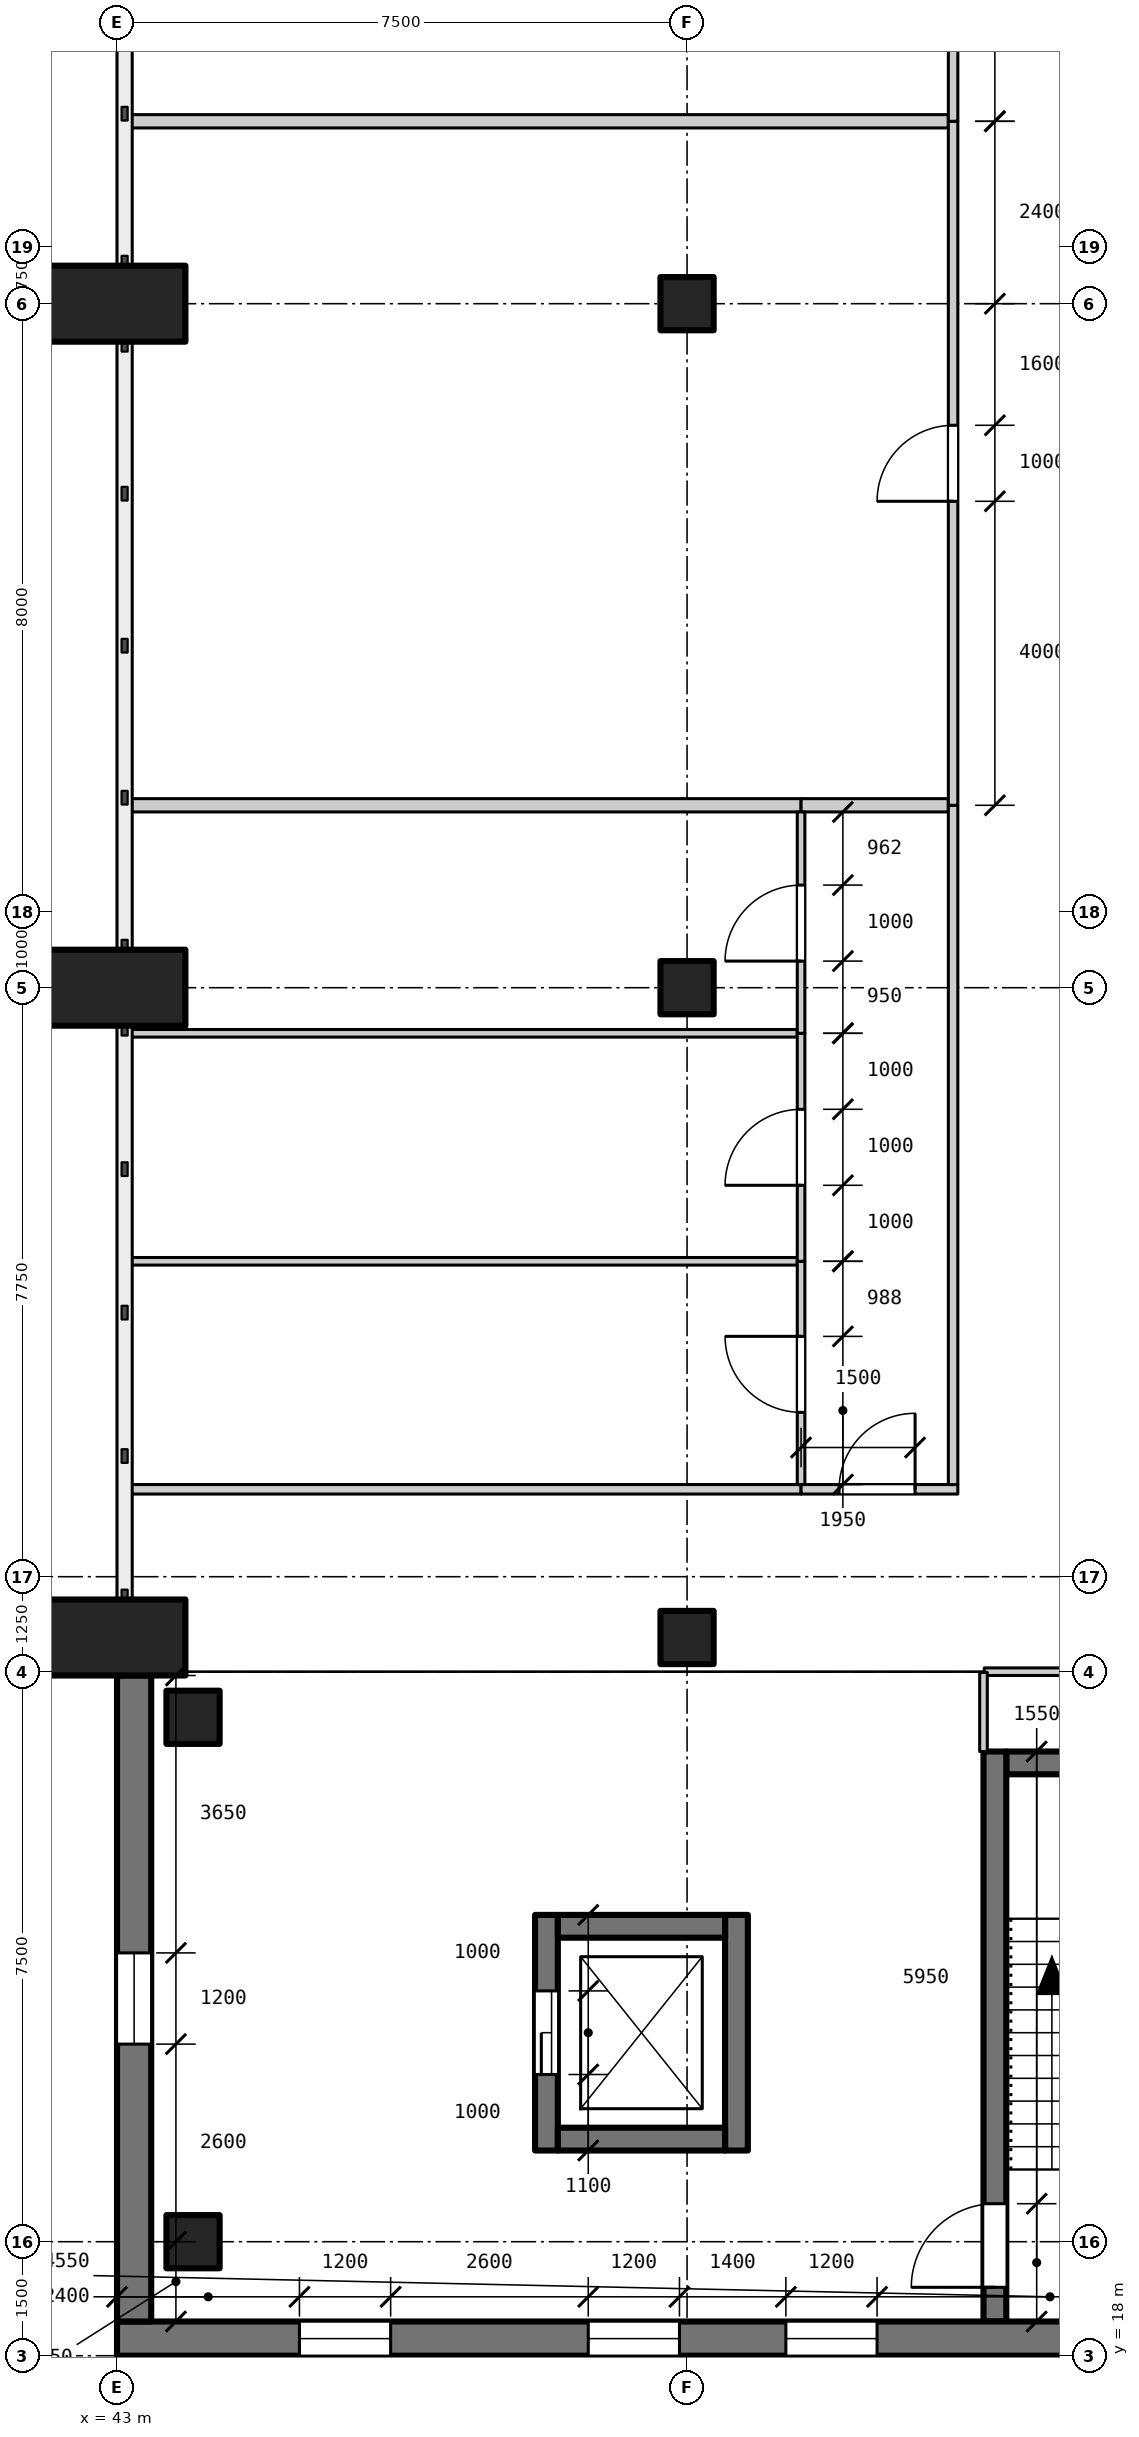
"""IFC4 building model, lengths in metres.
Left out: names, types, materials, properties, quantities, classifications, styles, units other than length and angle.
Written with IfcOpenShell. Run it as: python <this file> out.ifc"""

import sys

from ifc_helpers import new_model, si_unit, direction, frame, frame_2d, origin, origin_2d, place, context, subcontext, project, spatial, rectangle, extrude, element, fill, save


model = new_model("IFC4")
c1 = context("Model", 3, precision=1e-05, world=origin(), true_north=direction((0.0, 1.0)))
c2 = subcontext(c1, "Body", "Model", "MODEL_VIEW")
j1 = project(units=[si_unit("LENGTHUNIT", "METRE"), si_unit("PLANEANGLEUNIT", "RADIAN")], contexts=[c1])
p1 = place(None, origin())
s1 = spatial("IfcSite", under=j1, at=p1, CompositionType="ELEMENT")
p2 = place(p1, origin())
s2 = spatial("IfcBuilding", under=s1, at=p2, CompositionType="ELEMENT")
p3 = place(p2, frame((0.0, 0.0, 10.2)))
s3 = spatial("IfcBuildingStorey", under=s2, at=p3, CompositionType="ELEMENT", Elevation=10.2)
for number, where, z_axis, x_axis in (
    (1, (50.5, 27.45, 0.0), (0.0, 0.0, 1.0), (1.0, 0.0, 0.0)),
    (2, (50.5, 36.0, 0.0), (0.0, 0.0, 1.0), (1.0, 0.0, 0.0)),
    (3, (50.5, 45.0, 0.0), (0.0, 0.0, 1.0), (1.0, 0.0, 0.0)),
    (4, (44.0, 19.5, 0.0), (0.0, 0.0, 1.0), (1.0, 0.0, 0.0)),
    (5, (44.0, 26.4, 0.0), (0.0, 0.0, 1.0), (1.0, 0.0, 0.0)),
):
    element("IfcColumn", number, at=place(p3, frame(where, z_axis=z_axis, x_axis=x_axis)), inside=s3, PredefinedType="COLUMN", context=c2, shape_type="SweptSolid", body=[
        extrude(rectangle(XDim=0.7, YDim=0.7, at=origin_2d()), origin(), (0.0, 0.0, 1.0), 3.9),
    ])
p4 = place(p3, frame((54.7, 25.8, 0.0), z_axis=(0.0, 0.0, 1.0), x_axis=(1.0, 0.0, 0.0)))
e6 = element("IfcWall", 6, at=p4, inside=s3, PredefinedType="SHEAR", context=c2, shape_type="SweptSolid", body=[
    extrude(rectangle(XDim=3.0, YDim=0.3, at=frame_2d((1.5, 0.0))), origin(), (0.0, 0.0, 1.0), 3.9),
])
p5 = place(p3, frame((54.55, 18.45, 0.0), z_axis=(0.0, 0.0, 1.0), x_axis=(0.0, 1.0, 0.0)))
e7 = element("IfcWall", 7, at=p5, inside=s3, PredefinedType="SHEAR", context=c2, shape_type="SweptSolid", body=[
    extrude(rectangle(XDim=7.5, YDim=0.3, at=frame_2d((3.75, 0.0))), origin(), (0.0, 0.0, 1.0), 3.9),
])
p6 = place(p5, frame((0.45, 0.0, 0.0)))
e8 = element("IfcOpeningElement", 8, at=p6, cuts=e7, PredefinedType="OPENING", context=c2, shape_type="SweptSolid", body=[
    extrude(rectangle(XDim=1.1, YDim=2.1, at=frame_2d((0.55, 1.05))), frame((0.0, 0.16, 0.0), z_axis=(0.0, -1.0, 0.0), x_axis=(1.0, 0.0, 0.0)), (0.0, 0.0, 1.0), 0.32),
])
p7 = place(p3, frame((48.65, 20.7, 0.0), z_axis=(0.0, 0.0, 1.0), x_axis=(0.0, 1.0, 0.0)))
e9 = element("IfcWall", 9, at=p7, inside=s3, PredefinedType="SHEAR", context=c2, shape_type="SweptSolid", body=[
    extrude(rectangle(XDim=3.1, YDim=0.3, at=frame_2d((1.55, 0.0))), origin(), (0.0, 0.0, 1.0), 3.9),
])
p8 = place(p7, frame((1.0, 0.0, 0.0)))
e10 = element("IfcOpeningElement", 10, at=p8, cuts=e9, PredefinedType="OPENING", context=c2, shape_type="SweptSolid", body=[
    extrude(rectangle(XDim=1.1, YDim=2.1, at=frame_2d((0.55, 1.05))), frame((0.0, 0.16, 0.0), z_axis=(0.0, -1.0, 0.0), x_axis=(1.0, 0.0, 0.0)), (0.0, 0.0, 1.0), 0.32),
])
p9 = place(p3, frame((51.15, 20.7, 0.0), z_axis=(0.0, 0.0, 1.0), x_axis=(0.0, 1.0, 0.0)))
e11 = element("IfcWall", 11, at=p9, inside=s3, PredefinedType="SHEAR", context=c2, shape_type="SweptSolid", body=[
    extrude(rectangle(XDim=3.1, YDim=0.3, at=frame_2d((1.55, 0.0))), origin(), (0.0, 0.0, 1.0), 3.9),
])
for number, where, z_axis, x_axis in (
    (12, (48.8, 20.85, 0.0), (0.0, 0.0, 1.0), (1.0, 0.0, 0.0)),
    (13, (48.8, 23.65, 0.0), (0.0, 0.0, 1.0), (1.0, 0.0, 0.0)),
):
    element("IfcWall", number, at=place(p3, frame(where, z_axis=z_axis, x_axis=x_axis)), inside=s3, PredefinedType="SHEAR", context=c2, shape_type="SweptSolid", body=[
        extrude(rectangle(XDim=2.2, YDim=0.3, at=frame_2d((1.1, 0.0))), origin(), (0.0, 0.0, 1.0), 3.9),
    ])
for number, where, z_axis, x_axis in (
    (14, (43.0, 27.45, 0.0), (0.0, 0.0, 1.0), (1.0, 0.0, 0.0)),
    (15, (43.0, 36.0, 0.0), (0.0, 0.0, 1.0), (1.0, 0.0, 0.0)),
    (16, (43.0, 45.0, 0.0), (0.0, 0.0, 1.0), (1.0, 0.0, 0.0)),
):
    element("IfcColumn", number, at=place(p3, frame(where, z_axis=z_axis, x_axis=x_axis)), inside=s3, PredefinedType="COLUMN", context=c2, shape_type="SweptSolid", body=[
        extrude(rectangle(XDim=1.8, YDim=1.0, at=origin_2d()), origin(), (0.0, 0.0, 1.0), 4.2),
    ])
p10 = place(p3, frame((57.55, 18.225, 0.0), z_axis=(0.0, 0.0, 1.0), x_axis=(-1.0, 0.0, 0.0)))
e17 = element("IfcWall", 17, at=p10, inside=s3, PredefinedType="SOLIDWALL", context=c2, shape_type="SweptSolid", body=[
    extrude(rectangle(XDim=14.55, YDim=0.45, at=frame_2d((7.275, 0.0))), origin(), (0.0, 0.0, 1.0), 3.9),
])
p11 = place(p10, frame((4.55, 0.0, 0.9)))
e18 = element("IfcOpeningElement", 18, at=p11, cuts=e17, PredefinedType="OPENING", context=c2, shape_type="SweptSolid", body=[
    extrude(rectangle(XDim=1.2, YDim=1.5, at=frame_2d((0.6, 0.75))), frame((0.0, 0.235, 0.0), z_axis=(0.0, -1.0, 0.0), x_axis=(1.0, 0.0, 0.0)), (0.0, 0.0, 1.0), 0.47),
])
p12 = place(p10, frame((7.15, 0.0, 0.9)))
e19 = element("IfcOpeningElement", 19, at=p12, cuts=e17, PredefinedType="OPENING", context=c2, shape_type="SweptSolid", body=[
    extrude(rectangle(XDim=1.2, YDim=1.5, at=frame_2d((0.6, 0.75))), frame((0.0, 0.235, 0.0), z_axis=(0.0, -1.0, 0.0), x_axis=(1.0, 0.0, 0.0)), (0.0, 0.0, 1.0), 0.47),
])
p13 = place(p10, frame((10.95, 0.0, 0.9)))
e20 = element("IfcOpeningElement", 20, at=p13, cuts=e17, PredefinedType="OPENING", context=c2, shape_type="SweptSolid", body=[
    extrude(rectangle(XDim=1.2, YDim=1.5, at=frame_2d((0.6, 0.75))), frame((0.0, 0.235, 0.0), z_axis=(0.0, -1.0, 0.0), x_axis=(1.0, 0.0, 0.0)), (0.0, 0.0, 1.0), 0.47),
])
p14 = place(p3, frame((43.225, 18.45, 0.0), z_axis=(0.0, 0.0, 1.0), x_axis=(0.0, 1.0, 0.0)))
e21 = element("IfcWall", 21, at=p14, inside=s3, PredefinedType="SOLIDWALL", context=c2, shape_type="SweptSolid", body=[
    extrude(rectangle(XDim=8.5, YDim=0.45, at=frame_2d((4.25, 0.0))), origin(), (0.0, 0.0, 1.0), 3.9),
])
p15 = place(p14, frame((3.65, 0.0, 0.9)))
e22 = element("IfcOpeningElement", 22, at=p15, cuts=e21, PredefinedType="OPENING", context=c2, shape_type="SweptSolid", body=[
    extrude(rectangle(XDim=1.2, YDim=1.5, at=frame_2d((0.6, 0.75))), frame((0.0, 0.235, 0.0), z_axis=(0.0, -1.0, 0.0), x_axis=(1.0, 0.0, 0.0)), (0.0, 0.0, 1.0), 0.47),
])
p16 = place(p3, frame((54.41, 27.0, 0.0), z_axis=(0.0, 0.0, 1.0), x_axis=(1.0, 0.0, 0.0)))
e23 = element("IfcWall", 23, at=p16, inside=s3, PredefinedType="PARTITIONING", context=c2, shape_type="SweptSolid", body=[
    extrude(rectangle(XDim=3.14, YDim=0.1, at=frame_2d((1.57, 0.0))), origin(), (0.0, 0.0, 1.0), 3.9),
])
p17 = place(p3, frame((43.15, 29.4, 0.0), z_axis=(0.0, 0.0, 1.0), x_axis=(1.0, 0.0, 0.0)))
e24 = element("IfcWall", 24, at=p17, inside=s3, PredefinedType="PARTITIONING", context=c2, shape_type="SweptSolid", body=[
    extrude(rectangle(XDim=8.85, YDim=0.125, at=frame_2d((4.425, 0.0))), origin(), (0.0, 0.0, 1.0), 3.9),
])
p18 = place(p3, frame((52.0, 29.4, 0.0), z_axis=(0.0, 0.0, 1.0), x_axis=(1.0, 0.0, 0.0)))
e25 = element("IfcWall", 25, at=p18, inside=s3, PredefinedType="PARTITIONING", context=c2, shape_type="SweptSolid", body=[
    extrude(rectangle(XDim=2.062, YDim=0.125, at=frame_2d((1.031, 0.0))), origin(), (0.0, 0.0, 1.0), 3.9),
])
p19 = place(p18, frame((0.5, 0.0, 0.0)))
e26 = element("IfcOpeningElement", 26, at=p19, cuts=e25, PredefinedType="OPENING", context=c2, shape_type="SweptSolid", body=[
    extrude(rectangle(XDim=1.0, YDim=2.1, at=frame_2d((0.5, 1.05))), frame((0.0, 0.073, 0.0), z_axis=(0.0, -1.0, 0.0), x_axis=(1.0, 0.0, 0.0)), (0.0, 0.0, 1.0), 0.145),
])
for number, where, z_axis, x_axis in (
    (27, (43.15, 32.4, 0.0), (0.0, 0.0, 1.0), (1.0, 0.0, 0.0)),
    (28, (43.15, 35.4, 0.0), (0.0, 0.0, 1.0), (1.0, 0.0, 0.0)),
):
    element("IfcWall", number, at=place(p3, frame(where, z_axis=z_axis, x_axis=x_axis)), inside=s3, PredefinedType="PARTITIONING", context=c2, shape_type="SweptSolid", body=[
        extrude(rectangle(XDim=8.8, YDim=0.1, at=frame_2d((4.4, 0.0))), origin(), (0.0, 0.0, 1.0), 3.9),
    ])
p20 = place(p3, frame((43.15, 38.4, 0.0), z_axis=(0.0, 0.0, 1.0), x_axis=(1.0, 0.0, 0.0)))
e29 = element("IfcWall", 29, at=p20, inside=s3, PredefinedType="PARTITIONING", context=c2, shape_type="SweptSolid", body=[
    extrude(rectangle(XDim=8.85, YDim=0.175, at=frame_2d((4.425, 0.0))), origin(), (0.0, 0.0, 1.0), 3.9),
])
p21 = place(p3, frame((52.0, 38.4, 0.0), z_axis=(0.0, 0.0, 1.0), x_axis=(1.0, 0.0, 0.0)))
e30 = element("IfcWall", 30, at=p21, inside=s3, PredefinedType="PARTITIONING", context=c2, shape_type="SweptSolid", body=[
    extrude(rectangle(XDim=1.938, YDim=0.175, at=frame_2d((0.969, 0.0))), origin(), (0.0, 0.0, 1.0), 3.9),
])
p22 = place(p3, frame((43.15, 47.4, 0.0), z_axis=(0.0, 0.0, 1.0), x_axis=(1.0, 0.0, 0.0)))
e31 = element("IfcWall", 31, at=p22, inside=s3, PredefinedType="PARTITIONING", context=c2, shape_type="SweptSolid", body=[
    extrude(rectangle(XDim=10.788, YDim=0.175, at=frame_2d((5.394, 0.0))), origin(), (0.0, 0.0, 1.0), 3.9),
])
p23 = place(p3, frame((52.0, 29.462, 0.0), z_axis=(0.0, 0.0, 1.0), x_axis=(0.0, 1.0, 0.0)))
e32 = element("IfcWall", 32, at=p23, inside=s3, PredefinedType="PARTITIONING", context=c2, shape_type="SweptSolid", body=[
    extrude(rectangle(XDim=2.938, YDim=0.1, at=frame_2d((1.469, 0.0))), origin(), (0.0, 0.0, 1.0), 3.9),
])
p24 = place(p23, frame((0.95, 0.0, 0.0)))
e33 = element("IfcOpeningElement", 33, at=p24, cuts=e32, PredefinedType="OPENING", context=c2, shape_type="SweptSolid", body=[
    extrude(rectangle(XDim=1.0, YDim=2.1, at=frame_2d((0.5, 1.05))), frame((0.0, 0.06, 0.0), z_axis=(0.0, -1.0, 0.0), x_axis=(1.0, 0.0, 0.0)), (0.0, 0.0, 1.0), 0.12),
])
p25 = place(p3, frame((52.0, 32.4, 0.0), z_axis=(0.0, 0.0, 1.0), x_axis=(0.0, 1.0, 0.0)))
e34 = element("IfcWall", 34, at=p25, inside=s3, PredefinedType="PARTITIONING", context=c2, shape_type="SweptSolid", body=[
    extrude(rectangle(XDim=3.0, YDim=0.1, at=frame_2d((1.5, 0.0))), origin(), (0.0, 0.0, 1.0), 3.9),
])
p26 = place(p25, frame((1.0, 0.0, 0.0)))
e35 = element("IfcOpeningElement", 35, at=p26, cuts=e34, PredefinedType="OPENING", context=c2, shape_type="SweptSolid", body=[
    extrude(rectangle(XDim=1.0, YDim=2.1, at=frame_2d((0.5, 1.05))), frame((0.0, 0.06, 0.0), z_axis=(0.0, -1.0, 0.0), x_axis=(1.0, 0.0, 0.0)), (0.0, 0.0, 1.0), 0.12),
])
p27 = place(p3, frame((52.0, 35.4, 0.0), z_axis=(0.0, 0.0, 1.0), x_axis=(0.0, 1.0, 0.0)))
e36 = element("IfcWall", 36, at=p27, inside=s3, PredefinedType="PARTITIONING", context=c2, shape_type="SweptSolid", body=[
    extrude(rectangle(XDim=2.913, YDim=0.1, at=frame_2d((1.456, 0.0))), origin(), (0.0, 0.0, 1.0), 3.9),
])
p28 = place(p27, frame((0.95, 0.0, 0.0)))
e37 = element("IfcOpeningElement", 37, at=p28, cuts=e36, PredefinedType="OPENING", context=c2, shape_type="SweptSolid", body=[
    extrude(rectangle(XDim=1.0, YDim=2.1, at=frame_2d((0.5, 1.05))), frame((0.0, 0.06, 0.0), z_axis=(0.0, -1.0, 0.0), x_axis=(1.0, 0.0, 0.0)), (0.0, 0.0, 1.0), 0.12),
])
p29 = place(p3, frame((54.0, 29.462, 0.0), z_axis=(0.0, 0.0, 1.0), x_axis=(0.0, 1.0, 0.0)))
e38 = element("IfcWall", 38, at=p29, inside=s3, PredefinedType="PARTITIONING", context=c2, shape_type="SweptSolid", body=[
    extrude(rectangle(XDim=8.938, YDim=0.125, at=frame_2d((4.469, 0.0))), origin(), (0.0, 0.0, 1.0), 3.15),
])
p30 = place(p3, frame((54.0, 38.4, 0.0), z_axis=(0.0, 0.0, 1.0), x_axis=(0.0, 1.0, 0.0)))
e39 = element("IfcWall", 39, at=p30, inside=s3, PredefinedType="PARTITIONING", context=c2, shape_type="SweptSolid", body=[
    extrude(rectangle(XDim=9.0, YDim=0.125, at=frame_2d((4.5, 0.0))), origin(), (0.0, 0.0, 1.0), 3.15),
])
p31 = place(p30, frame((4.0, 0.0, 0.0)))
e40 = element("IfcOpeningElement", 40, at=p31, cuts=e39, PredefinedType="OPENING", context=c2, shape_type="SweptSolid", body=[
    extrude(rectangle(XDim=1.0, YDim=2.1, at=frame_2d((0.5, 1.05))), frame((0.0, 0.073, 0.0), z_axis=(0.0, -1.0, 0.0), x_axis=(1.0, 0.0, 0.0)), (0.0, 0.0, 1.0), 0.145),
])
p32 = place(p3, frame((54.0, 47.4, 0.0), z_axis=(0.0, 0.0, 1.0), x_axis=(0.0, 1.0, 0.0)))
e41 = element("IfcWall", 41, at=p32, inside=s3, PredefinedType="PARTITIONING", context=c2, shape_type="SweptSolid", body=[
    extrude(rectangle(XDim=9.0, YDim=0.125, at=frame_2d((4.5, 0.0))), origin(), (0.0, 0.0, 1.0), 3.15),
])
p33 = place(p32, frame((4.0, 0.0, 0.0)))
e42 = element("IfcOpeningElement", 42, at=p33, cuts=e41, PredefinedType="OPENING", context=c2, shape_type="SweptSolid", body=[
    extrude(rectangle(XDim=1.0, YDim=2.1, at=frame_2d((0.5, 1.05))), frame((0.0, 0.073, 0.0), z_axis=(0.0, -1.0, 0.0), x_axis=(1.0, 0.0, 0.0)), (0.0, 0.0, 1.0), 0.145),
])
p34 = place(p3, frame((54.4, 25.95, 0.0), z_axis=(0.0, 0.0, 1.0), x_axis=(0.0, 1.0, 0.0)))
e43 = element("IfcWall", 43, at=p34, inside=s3, PredefinedType="PARTITIONING", context=c2, shape_type="SweptSolid", body=[
    extrude(rectangle(XDim=1.04, YDim=0.1, at=frame_2d((0.52, 0.0))), origin(), (0.0, 0.0, 1.0), 3.9),
])
p35 = place(p11, origin())
e44 = element("IfcWindow", 44, at=p35, inside=s3, PartitioningType="SINGLE_PANEL", PredefinedType="WINDOW", context=c2, shape_type="SweptSolid", body=[
    extrude(rectangle(XDim=1.2, YDim=1.5, at=frame_2d((0.6, 0.75))), frame((0.0, -0.075, 0.0), z_axis=(0.0, -1.0, 0.0), x_axis=(1.0, 0.0, 0.0)), (0.0, 0.0, 1.0), 0.06),
])
fill(e18, e44)
p36 = place(p12, origin())
e45 = element("IfcWindow", 45, at=p36, inside=s3, PartitioningType="SINGLE_PANEL", PredefinedType="WINDOW", context=c2, shape_type="SweptSolid", body=[
    extrude(rectangle(XDim=1.2, YDim=1.5, at=frame_2d((0.6, 0.75))), frame((0.0, -0.075, 0.0), z_axis=(0.0, -1.0, 0.0), x_axis=(1.0, 0.0, 0.0)), (0.0, 0.0, 1.0), 0.06),
])
fill(e19, e45)
p37 = place(p13, origin())
e46 = element("IfcWindow", 46, at=p37, inside=s3, PartitioningType="SINGLE_PANEL", PredefinedType="WINDOW", context=c2, shape_type="SweptSolid", body=[
    extrude(rectangle(XDim=1.2, YDim=1.5, at=frame_2d((0.6, 0.75))), frame((0.0, -0.075, 0.0), z_axis=(0.0, -1.0, 0.0), x_axis=(1.0, 0.0, 0.0)), (0.0, 0.0, 1.0), 0.06),
])
fill(e20, e46)
p38 = place(p15, origin())
e47 = element("IfcWindow", 47, at=p38, inside=s3, PartitioningType="SINGLE_PANEL", PredefinedType="WINDOW", context=c2, shape_type="SweptSolid", body=[
    extrude(rectangle(XDim=1.2, YDim=1.5, at=frame_2d((0.6, 0.75))), frame((0.0, -0.075, 0.0), z_axis=(0.0, -1.0, 0.0), x_axis=(1.0, 0.0, 0.0)), (0.0, 0.0, 1.0), 0.06),
])
fill(e22, e47)
p39 = place(p19, origin())
e48 = element("IfcDoor", 48, at=p39, inside=s3, OperationType="SINGLE_SWING_RIGHT", PredefinedType="DOOR", context=c2, shape_type="SweptSolid", body=[
    extrude(rectangle(XDim=1.0, YDim=2.1, at=frame_2d((0.5, 1.05))), frame((0.0, 0.025, 0.0), z_axis=(0.0, -1.0, 0.0), x_axis=(1.0, 0.0, 0.0)), (0.0, 0.0, 1.0), 0.05),
])
fill(e26, e48)
p40 = place(p24, origin())
e49 = element("IfcDoor", 49, at=p40, inside=s3, OperationType="SINGLE_SWING_RIGHT", PredefinedType="DOOR", context=c2, shape_type="SweptSolid", body=[
    extrude(rectangle(XDim=1.0, YDim=2.1, at=frame_2d((0.5, 1.05))), frame((0.0, 0.025, 0.0), z_axis=(0.0, -1.0, 0.0), x_axis=(1.0, 0.0, 0.0)), (0.0, 0.0, 1.0), 0.05),
])
fill(e33, e49)
p41 = place(p26, origin())
e50 = element("IfcDoor", 50, at=p41, inside=s3, OperationType="SINGLE_SWING_LEFT", PredefinedType="DOOR", context=c2, shape_type="SweptSolid", body=[
    extrude(rectangle(XDim=1.0, YDim=2.1, at=frame_2d((0.5, 1.05))), frame((0.0, 0.025, 0.0), z_axis=(0.0, -1.0, 0.0), x_axis=(1.0, 0.0, 0.0)), (0.0, 0.0, 1.0), 0.05),
])
fill(e35, e50)
p42 = place(p28, origin())
e51 = element("IfcDoor", 51, at=p42, inside=s3, OperationType="SINGLE_SWING_LEFT", PredefinedType="DOOR", context=c2, shape_type="SweptSolid", body=[
    extrude(rectangle(XDim=1.0, YDim=2.1, at=frame_2d((0.5, 1.05))), frame((0.0, 0.025, 0.0), z_axis=(0.0, -1.0, 0.0), x_axis=(1.0, 0.0, 0.0)), (0.0, 0.0, 1.0), 0.05),
])
fill(e37, e51)
p43 = place(p31, origin())
e52 = element("IfcDoor", 52, at=p43, inside=s3, OperationType="SINGLE_SWING_LEFT", PredefinedType="DOOR", context=c2, shape_type="SweptSolid", body=[
    extrude(rectangle(XDim=1.0, YDim=2.1, at=frame_2d((0.5, 1.05))), frame((0.0, 0.025, 0.0), z_axis=(0.0, -1.0, 0.0), x_axis=(1.0, 0.0, 0.0)), (0.0, 0.0, 1.0), 0.05),
])
fill(e40, e52)
p44 = place(p6, origin())
e53 = element("IfcDoor", 53, at=p44, inside=s3, OperationType="SINGLE_SWING_LEFT", PredefinedType="DOOR", context=c2, shape_type="SweptSolid", body=[
    extrude(rectangle(XDim=1.1, YDim=2.1, at=frame_2d((0.55, 1.05))), frame((0.0, 0.025, 0.0), z_axis=(0.0, -1.0, 0.0), x_axis=(1.0, 0.0, 0.0)), (0.0, 0.0, 1.0), 0.05),
])
fill(e8, e53)
p45 = place(p8, origin())
e54 = element("IfcDoor", 54, at=p45, inside=s3, OperationType="SLIDING_TO_LEFT", PredefinedType="DOOR", context=c2, shape_type="SweptSolid", body=[
    extrude(rectangle(XDim=1.1, YDim=2.1, at=frame_2d((0.55, 1.05))), frame((0.0, 0.025, 0.0), z_axis=(0.0, -1.0, 0.0), x_axis=(1.0, 0.0, 0.0)), (0.0, 0.0, 1.0), 0.05),
])
fill(e10, e54)
save(model, sys.argv[1])
